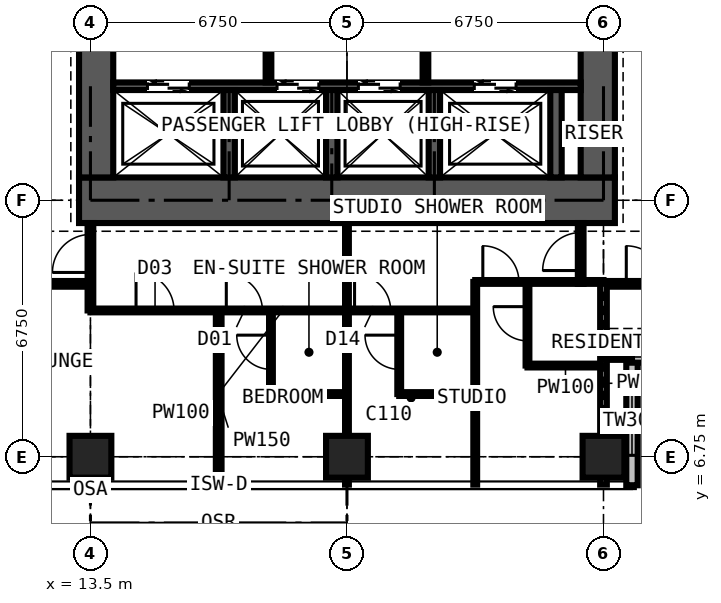
"""IFC4 building model, lengths in metres.
Left out: names, types, materials, properties, quantities, classifications, styles, units other than length and angle.
Written with IfcOpenShell. Run it as: python <this file> out.ifc"""

import sys

from ifc_helpers import new_model, si_unit, direction, frame, frame_2d, origin, origin_2d, place, context, subcontext, project, spatial, rectangle, extrude, element, fill, save


model = new_model("IFC4")
c1 = context("Model", 3, precision=1e-05, world=origin(), true_north=direction((0.0, 1.0)))
c2 = subcontext(c1, "Body", "Model", "MODEL_VIEW")
j1 = project(units=[si_unit("LENGTHUNIT", "METRE"), si_unit("PLANEANGLEUNIT", "RADIAN")], contexts=[c1])
p1 = place(None, origin())
s1 = spatial("IfcSite", under=j1, at=p1, CompositionType="ELEMENT")
p2 = place(p1, origin())
s2 = spatial("IfcBuilding", under=s1, at=p2, CompositionType="ELEMENT")
p3 = place(p2, frame((0.0, 0.0, 215.1)))
s3 = spatial("IfcBuildingStorey", under=s2, at=p3, CompositionType="ELEMENT", Elevation=215.1)
for number, where, z_axis, x_axis in (
    (1, (13.5, 6.75, 0.0), (0.0, 0.0, 1.0), (1.0, 0.0, 0.0)),
    (2, (20.25, 6.75, 0.0), (0.0, 0.0, 1.0), (1.0, 0.0, 0.0)),
    (3, (27.0, 6.75, 0.0), (0.0, 0.0, 1.0), (1.0, 0.0, 0.0)),
):
    element("IfcColumn", number, at=place(p3, frame(where, z_axis=z_axis, x_axis=x_axis)), inside=s3, PredefinedType="COLUMN", context=c2, shape_type="SweptSolid", body=[
        extrude(rectangle(XDim=1.1, YDim=1.1, at=origin_2d()), origin(), (0.0, 0.0, 1.0), 3.6),
    ])
p4 = place(p3, frame((13.2, 13.5, 0.0), z_axis=(0.0, 0.0, 1.0), x_axis=(1.0, 0.0, 0.0)))
e4 = element("IfcWall", 4, at=p4, inside=s3, PredefinedType="SHEAR", context=c2, shape_type="SweptSolid", body=[
    extrude(rectangle(XDim=14.1, YDim=1.2, at=frame_2d((7.05, 0.0))), origin(), (0.0, 0.0, 1.0), 3.6),
])
p5 = place(p3, frame((26.85, 14.1, 0.0), z_axis=(0.0, 0.0, 1.0), x_axis=(0.0, 1.0, 0.0)))
e5 = element("IfcWall", 5, at=p5, inside=s3, PredefinedType="SHEAR", context=c2, shape_type="SweptSolid", body=[
    extrude(rectangle(XDim=12.3, YDim=0.9, at=frame_2d((6.15, 0.0))), origin(), (0.0, 0.0, 1.0), 3.6),
])
p6 = place(p5, frame((3.65, 0.0, 0.0)))
e6 = element("IfcOpeningElement", 6, at=p6, cuts=e5, PredefinedType="OPENING", context=c2, shape_type="SweptSolid", body=[
    extrude(rectangle(XDim=1.2, YDim=2.2, at=frame_2d((0.6, 1.1))), frame((0.0, 0.46, 0.0), z_axis=(0.0, -1.0, 0.0), x_axis=(1.0, 0.0, 0.0)), (0.0, 0.0, 1.0), 0.92),
])
p7 = place(p3, frame((13.65, 26.4, 0.0), z_axis=(0.0, 0.0, 1.0), x_axis=(0.0, -1.0, 0.0)))
e7 = element("IfcWall", 7, at=p7, inside=s3, PredefinedType="SHEAR", context=c2, shape_type="SweptSolid", body=[
    extrude(rectangle(XDim=12.3, YDim=0.9, at=frame_2d((6.15, 0.0))), origin(), (0.0, 0.0, 1.0), 3.6),
])
p8 = place(p7, frame((7.45, 0.0, 0.0)))
e8 = element("IfcOpeningElement", 8, at=p8, cuts=e7, PredefinedType="OPENING", context=c2, shape_type="SweptSolid", body=[
    extrude(rectangle(XDim=1.2, YDim=2.2, at=frame_2d((0.6, 1.1))), frame((0.0, 0.46, 0.0), z_axis=(0.0, -1.0, 0.0), x_axis=(1.0, 0.0, 0.0)), (0.0, 0.0, 1.0), 0.92),
])
p9 = place(p3, frame((27.75, 6.0, 0.0), z_axis=(0.0, 0.0, 1.0), x_axis=(0.0, 1.0, 0.0)))
e9 = element("IfcWall", 9, at=p9, inside=s3, PredefinedType="SOLIDWALL", context=c2, shape_type="SweptSolid", body=[
    extrude(rectangle(XDim=3.375, YDim=0.3, at=frame_2d((1.688, 0.0))), origin(), (0.0, 0.0, 1.0), 3.375),
])
p10 = place(p9, frame((0.788, 0.0, 0.6)))
e10 = element("IfcOpeningElement", 10, at=p10, cuts=e9, PredefinedType="OPENING", context=c2, shape_type="SweptSolid", body=[
    extrude(rectangle(XDim=1.8, YDim=2.1, at=frame_2d((0.9, 1.05))), frame((0.0, 0.16, 0.0), z_axis=(0.0, -1.0, 0.0), x_axis=(1.0, 0.0, 0.0)), (0.0, 0.0, 1.0), 0.32),
])
p11 = place(p3, frame((27.75, 9.375, 0.0), z_axis=(0.0, 0.0, 1.0), x_axis=(1.0, 0.0, 0.0)))
e11 = element("IfcWall", 11, at=p11, inside=s3, PredefinedType="SOLIDWALL", context=c2, shape_type="SweptSolid", body=[
    extrude(rectangle(XDim=3.375, YDim=0.3, at=frame_2d((1.688, 0.0))), origin(), (0.0, 0.0, 1.0), 3.375),
])
p12 = place(p11, frame((0.788, 0.0, 0.6)))
e12 = element("IfcOpeningElement", 12, at=p12, cuts=e11, PredefinedType="OPENING", context=c2, shape_type="SweptSolid", body=[
    extrude(rectangle(XDim=1.8, YDim=2.1, at=frame_2d((0.9, 1.05))), frame((0.0, 0.16, 0.0), z_axis=(0.0, -1.0, 0.0), x_axis=(1.0, 0.0, 0.0)), (0.0, 0.0, 1.0), 0.32),
])
p13 = place(p3, frame((14.1, 16.5, 0.0), z_axis=(0.0, 0.0, 1.0), x_axis=(1.0, 0.0, 0.0)))
e13 = element("IfcWall", 13, at=p13, inside=s3, PredefinedType="SHEAR", context=c2, shape_type="SweptSolid", body=[
    extrude(rectangle(XDim=12.3, YDim=0.2, at=frame_2d((6.15, 0.0))), origin(), (0.0, 0.0, 1.0), 3.6),
])
p14 = place(p13, frame((0.9, 0.0, 0.0)))
e14 = element("IfcOpeningElement", 14, at=p14, cuts=e13, PredefinedType="OPENING", context=c2, shape_type="SweptSolid", body=[
    extrude(rectangle(XDim=1.1, YDim=2.2, at=frame_2d((0.55, 1.1))), frame((0.0, 0.11, 0.0), z_axis=(0.0, -1.0, 0.0), x_axis=(1.0, 0.0, 0.0)), (0.0, 0.0, 1.0), 0.22),
])
p15 = place(p13, frame((4.31, 0.0, 0.0)))
e15 = element("IfcOpeningElement", 15, at=p15, cuts=e13, PredefinedType="OPENING", context=c2, shape_type="SweptSolid", body=[
    extrude(rectangle(XDim=1.1, YDim=2.2, at=frame_2d((0.55, 1.1))), frame((0.0, 0.11, 0.0), z_axis=(0.0, -1.0, 0.0), x_axis=(1.0, 0.0, 0.0)), (0.0, 0.0, 1.0), 0.22),
])
p16 = place(p13, frame((6.45, 0.0, 0.0)))
e16 = element("IfcOpeningElement", 16, at=p16, cuts=e13, PredefinedType="OPENING", context=c2, shape_type="SweptSolid", body=[
    extrude(rectangle(XDim=1.1, YDim=2.2, at=frame_2d((0.55, 1.1))), frame((0.0, 0.11, 0.0), z_axis=(0.0, -1.0, 0.0), x_axis=(1.0, 0.0, 0.0)), (0.0, 0.0, 1.0), 0.22),
])
p17 = place(p13, frame((9.5, 0.0, 0.0)))
e17 = element("IfcOpeningElement", 17, at=p17, cuts=e13, PredefinedType="OPENING", context=c2, shape_type="SweptSolid", body=[
    extrude(rectangle(XDim=1.1, YDim=2.2, at=frame_2d((0.55, 1.1))), frame((0.0, 0.11, 0.0), z_axis=(0.0, -1.0, 0.0), x_axis=(1.0, 0.0, 0.0)), (0.0, 0.0, 1.0), 0.22),
])
for number, where, z_axis, x_axis in (
    (18, (17.15, 14.1, 0.0), (0.0, 0.0, 1.0), (0.0, 1.0, 0.0)),
    (19, (19.85, 14.1, 0.0), (0.0, 0.0, 1.0), (0.0, 1.0, 0.0)),
    (20, (22.55, 14.1, 0.0), (0.0, 0.0, 1.0), (0.0, 1.0, 0.0)),
    (21, (25.75, 14.1, 0.0), (0.0, 0.0, 1.0), (0.0, 1.0, 0.0)),
):
    element("IfcWall", number, at=place(p3, frame(where, z_axis=z_axis, x_axis=x_axis)), inside=s3, PredefinedType="SHEAR", context=c2, shape_type="SweptSolid", body=[
        extrude(rectangle(XDim=2.3, YDim=0.3, at=frame_2d((1.15, 0.0))), origin(), (0.0, 0.0, 1.0), 3.6),
    ])
p18 = place(p3, frame((18.185, 16.6, 0.0), z_axis=(0.0, 0.0, 1.0), x_axis=(0.0, 1.0, 0.0)))
e22 = element("IfcWall", 22, at=p18, inside=s3, PredefinedType="PARTITIONING", context=c2, shape_type="SweptSolid", body=[
    extrude(rectangle(XDim=3.5, YDim=0.15, at=frame_2d((1.75, 0.0))), origin(), (0.0, 0.0, 1.0), 3.375),
])
p19 = place(p18, frame((1.15, 0.0, 0.0)))
e23 = element("IfcOpeningElement", 23, at=p19, cuts=e22, PredefinedType="OPENING", context=c2, shape_type="SweptSolid", body=[
    extrude(rectangle(XDim=1.2, YDim=2.2, at=frame_2d((0.6, 1.1))), frame((0.0, 0.085, 0.0), z_axis=(0.0, -1.0, 0.0), x_axis=(1.0, 0.0, 0.0)), (0.0, 0.0, 1.0), 0.17),
])
p20 = place(p3, frame((22.315, 16.6, 0.0), z_axis=(0.0, 0.0, 1.0), x_axis=(0.0, 1.0, 0.0)))
e24 = element("IfcWall", 24, at=p20, inside=s3, PredefinedType="PARTITIONING", context=c2, shape_type="SweptSolid", body=[
    extrude(rectangle(XDim=3.5, YDim=0.15, at=frame_2d((1.75, 0.0))), origin(), (0.0, 0.0, 1.0), 3.375),
])
p21 = place(p20, frame((1.15, 0.0, 0.0)))
e25 = element("IfcOpeningElement", 25, at=p21, cuts=e24, PredefinedType="OPENING", context=c2, shape_type="SweptSolid", body=[
    extrude(rectangle(XDim=1.2, YDim=2.2, at=frame_2d((0.6, 1.1))), frame((0.0, 0.085, 0.0), z_axis=(0.0, -1.0, 0.0), x_axis=(1.0, 0.0, 0.0)), (0.0, 0.0, 1.0), 0.17),
])
p22 = place(p3, frame((10.125, 11.3, 0.0), z_axis=(0.0, 0.0, 1.0), x_axis=(1.0, 0.0, 0.0)))
e26 = element("IfcWall", 26, at=p22, inside=s3, PredefinedType="PARTITIONING", context=c2, shape_type="SweptSolid", body=[
    extrude(rectangle(XDim=3.375, YDim=0.15, at=frame_2d((1.688, 0.0))), origin(), (0.0, 0.0, 1.0), 3.375),
])
p23 = place(p3, frame((13.5, 10.6, 0.0), z_axis=(0.0, 0.0, 1.0), x_axis=(0.0, 1.0, 0.0)))
e27 = element("IfcWall", 27, at=p23, inside=s3, PredefinedType="PARTITIONING", context=c2, shape_type="SweptSolid", body=[
    extrude(rectangle(XDim=2.3, YDim=0.15, at=frame_2d((1.15, 0.0))), origin(), (0.0, 0.0, 1.0), 2.877),
])
p24 = place(p23, frame((1.0, 0.0, 0.0)))
e28 = element("IfcOpeningElement", 28, at=p24, cuts=e27, PredefinedType="OPENING", context=c2, shape_type="SweptSolid", body=[
    extrude(rectangle(XDim=1.0, YDim=2.2, at=frame_2d((0.5, 1.1))), frame((0.0, 0.085, 0.0), z_axis=(0.0, -1.0, 0.0), x_axis=(1.0, 0.0, 0.0)), (0.0, 0.0, 1.0), 0.17),
])
p25 = place(p3, frame((13.5, 10.6, 0.0), z_axis=(0.0, 0.0, 1.0), x_axis=(1.0, 0.0, 0.0)))
e29 = element("IfcWall", 29, at=p25, inside=s3, PredefinedType="PARTITIONING", context=c2, shape_type="SweptSolid", body=[
    extrude(rectangle(XDim=10.125, YDim=0.1, at=frame_2d((5.062, 0.0))), origin(), (0.0, 0.0, 1.0), 3.375),
])
p26 = place(p25, frame((1.2, 0.0, 0.0)))
e30 = element("IfcOpeningElement", 30, at=p26, cuts=e29, PredefinedType="OPENING", context=c2, shape_type="SweptSolid", body=[
    extrude(rectangle(XDim=1.0, YDim=2.2, at=frame_2d((0.5, 1.1))), frame((0.0, 0.06, 0.0), z_axis=(0.0, -1.0, 0.0), x_axis=(1.0, 0.0, 0.0)), (0.0, 0.0, 1.0), 0.12),
])
p27 = place(p25, frame((3.575, 0.0, 0.0)))
e31 = element("IfcOpeningElement", 31, at=p27, cuts=e29, PredefinedType="OPENING", context=c2, shape_type="SweptSolid", body=[
    extrude(rectangle(XDim=0.95, YDim=2.2, at=frame_2d((0.475, 1.1))), frame((0.0, 0.06, 0.0), z_axis=(0.0, -1.0, 0.0), x_axis=(1.0, 0.0, 0.0)), (0.0, 0.0, 1.0), 0.12),
])
p28 = place(p25, frame((6.95, 0.0, 0.0)))
e32 = element("IfcOpeningElement", 32, at=p28, cuts=e29, PredefinedType="OPENING", context=c2, shape_type="SweptSolid", body=[
    extrude(rectangle(XDim=0.95, YDim=2.2, at=frame_2d((0.475, 1.1))), frame((0.0, 0.06, 0.0), z_axis=(0.0, -1.0, 0.0), x_axis=(1.0, 0.0, 0.0)), (0.0, 0.0, 1.0), 0.12),
])
p29 = place(p3, frame((16.875, 6.016, 0.0), z_axis=(0.0, 0.0, 1.0), x_axis=(0.0, 1.0, 0.0)))
e33 = element("IfcWall", 33, at=p29, inside=s3, PredefinedType="PARTITIONING", context=c2, shape_type="SweptSolid", body=[
    extrude(rectangle(XDim=4.584, YDim=0.15, at=frame_2d((2.292, 0.0))), origin(), (0.0, 0.0, 1.0), 3.375),
])
p30 = place(p3, frame((18.25, 8.4, 0.0), z_axis=(0.0, 0.0, 1.0), x_axis=(0.0, 1.0, 0.0)))
e34 = element("IfcWall", 34, at=p30, inside=s3, PredefinedType="PARTITIONING", context=c2, shape_type="SweptSolid", body=[
    extrude(rectangle(XDim=2.2, YDim=0.1, at=frame_2d((1.1, 0.0))), origin(), (0.0, 0.0, 1.0), 3.375),
])
p31 = place(p30, frame((0.65, 0.0, 0.0)))
e35 = element("IfcOpeningElement", 35, at=p31, cuts=e34, PredefinedType="OPENING", context=c2, shape_type="SweptSolid", body=[
    extrude(rectangle(XDim=0.9, YDim=2.2, at=frame_2d((0.45, 1.1))), frame((0.0, 0.06, 0.0), z_axis=(0.0, -1.0, 0.0), x_axis=(1.0, 0.0, 0.0)), (0.0, 0.0, 1.0), 0.12),
])
p32 = place(p3, frame((18.25, 8.4, 0.0), z_axis=(0.0, 0.0, 1.0), x_axis=(1.0, 0.0, 0.0)))
e36 = element("IfcWall", 36, at=p32, inside=s3, PredefinedType="PARTITIONING", context=c2, shape_type="SweptSolid", body=[
    extrude(rectangle(XDim=2.0, YDim=0.1, at=frame_2d((1.0, 0.0))), origin(), (0.0, 0.0, 1.0), 3.375),
])
p33 = place(p3, frame((20.25, 6.016, 0.0), z_axis=(0.0, 0.0, 1.0), x_axis=(0.0, 1.0, 0.0)))
e37 = element("IfcWall", 37, at=p33, inside=s3, PredefinedType="PARTITIONING", context=c2, shape_type="SweptSolid", body=[
    extrude(rectangle(XDim=6.884, YDim=0.1, at=frame_2d((3.442, 0.0))), origin(), (0.0, 0.0, 1.0), 2.61),
])
p34 = place(p3, frame((21.625, 8.4, 0.0), z_axis=(0.0, 0.0, 1.0), x_axis=(0.0, 1.0, 0.0)))
e38 = element("IfcWall", 38, at=p34, inside=s3, PredefinedType="PARTITIONING", context=c2, shape_type="SweptSolid", body=[
    extrude(rectangle(XDim=2.2, YDim=0.1, at=frame_2d((1.1, 0.0))), origin(), (0.0, 0.0, 1.0), 3.375),
])
p35 = place(p34, frame((0.65, 0.0, 0.0)))
e39 = element("IfcOpeningElement", 39, at=p35, cuts=e38, PredefinedType="OPENING", context=c2, shape_type="SweptSolid", body=[
    extrude(rectangle(XDim=0.9, YDim=2.2, at=frame_2d((0.45, 1.1))), frame((0.0, 0.06, 0.0), z_axis=(0.0, -1.0, 0.0), x_axis=(1.0, 0.0, 0.0)), (0.0, 0.0, 1.0), 0.12),
])
p36 = place(p3, frame((21.625, 8.4, 0.0), z_axis=(0.0, 0.0, 1.0), x_axis=(1.0, 0.0, 0.0)))
e40 = element("IfcWall", 40, at=p36, inside=s3, PredefinedType="PARTITIONING", context=c2, shape_type="SweptSolid", body=[
    extrude(rectangle(XDim=2.0, YDim=0.1, at=frame_2d((1.0, 0.0))), origin(), (0.0, 0.0, 1.0), 3.375),
])
p37 = place(p3, frame((23.625, 6.016, 0.0), z_axis=(0.0, 0.0, 1.0), x_axis=(0.0, 1.0, 0.0)))
e41 = element("IfcWall", 41, at=p37, inside=s3, PredefinedType="PARTITIONING", context=c2, shape_type="SweptSolid", body=[
    extrude(rectangle(XDim=5.334, YDim=0.1, at=frame_2d((2.667, 0.0))), origin(), (0.0, 0.0, 1.0), 3.375),
])
p38 = place(p3, frame((23.625, 11.35, 0.0), z_axis=(0.0, 0.0, 1.0), x_axis=(1.0, 0.0, 0.0)))
e42 = element("IfcWall", 42, at=p38, inside=s3, PredefinedType="PARTITIONING", context=c2, shape_type="SweptSolid", body=[
    extrude(rectangle(XDim=3.375, YDim=0.1, at=frame_2d((1.688, 0.0))), origin(), (0.0, 0.0, 1.0), 3.375),
])
p39 = place(p38, frame((0.2, 0.0, 0.0)))
e43 = element("IfcOpeningElement", 43, at=p39, cuts=e42, PredefinedType="OPENING", context=c2, shape_type="SweptSolid", body=[
    extrude(rectangle(XDim=0.95, YDim=2.2, at=frame_2d((0.475, 1.1))), frame((0.0, 0.06, 0.0), z_axis=(0.0, -1.0, 0.0), x_axis=(1.0, 0.0, 0.0)), (0.0, 0.0, 1.0), 0.12),
])
p40 = place(p3, frame((25.0, 9.15, 0.0), z_axis=(0.0, 0.0, 1.0), x_axis=(0.0, 1.0, 0.0)))
e44 = element("IfcWall", 44, at=p40, inside=s3, PredefinedType="PARTITIONING", context=c2, shape_type="SweptSolid", body=[
    extrude(rectangle(XDim=2.2, YDim=0.1, at=frame_2d((1.1, 0.0))), origin(), (0.0, 0.0, 1.0), 3.375),
])
p41 = place(p40, frame((0.65, 0.0, 0.0)))
e45 = element("IfcOpeningElement", 45, at=p41, cuts=e44, PredefinedType="OPENING", context=c2, shape_type="SweptSolid", body=[
    extrude(rectangle(XDim=0.9, YDim=2.2, at=frame_2d((0.45, 1.1))), frame((0.0, 0.06, 0.0), z_axis=(0.0, -1.0, 0.0), x_axis=(1.0, 0.0, 0.0)), (0.0, 0.0, 1.0), 0.12),
])
p42 = place(p3, frame((25.0, 9.15, 0.0), z_axis=(0.0, 0.0, 1.0), x_axis=(1.0, 0.0, 0.0)))
e46 = element("IfcWall", 46, at=p42, inside=s3, PredefinedType="PARTITIONING", context=c2, shape_type="SweptSolid", body=[
    extrude(rectangle(XDim=2.0, YDim=0.1, at=frame_2d((1.0, 0.0))), origin(), (0.0, 0.0, 1.0), 3.375),
])
p43 = place(p3, frame((26.4, 11.3, 0.0), z_axis=(0.0, 0.0, 1.0), x_axis=(0.0, 1.0, 0.0)))
e47 = element("IfcWall", 47, at=p43, inside=s3, PredefinedType="PARTITIONING", context=c2, shape_type="SweptSolid", body=[
    extrude(rectangle(XDim=1.6, YDim=0.15, at=frame_2d((0.8, 0.0))), origin(), (0.0, 0.0, 1.0), 3.375),
])
p44 = place(p43, frame((0.35, 0.0, 0.0)))
e48 = element("IfcOpeningElement", 48, at=p44, cuts=e47, PredefinedType="OPENING", context=c2, shape_type="SweptSolid", body=[
    extrude(rectangle(XDim=1.0, YDim=2.2, at=frame_2d((0.5, 1.1))), frame((0.0, 0.085, 0.0), z_axis=(0.0, -1.0, 0.0), x_axis=(1.0, 0.0, 0.0)), (0.0, 0.0, 1.0), 0.17),
])
p45 = place(p3, frame((27.0, 11.3, 0.0), z_axis=(0.0, 0.0, 1.0), x_axis=(1.0, 0.0, 0.0)))
e49 = element("IfcWall", 49, at=p45, inside=s3, PredefinedType="PARTITIONING", context=c2, shape_type="SweptSolid", body=[
    extrude(rectangle(XDim=3.375, YDim=0.15, at=frame_2d((1.688, 0.0))), origin(), (0.0, 0.0, 1.0), 3.375),
])
p46 = place(p45, frame((0.6, 0.0, 0.0)))
e50 = element("IfcOpeningElement", 50, at=p46, cuts=e49, PredefinedType="OPENING", context=c2, shape_type="SweptSolid", body=[
    extrude(rectangle(XDim=1.0, YDim=2.2, at=frame_2d((0.5, 1.1))), frame((0.0, 0.085, 0.0), z_axis=(0.0, -1.0, 0.0), x_axis=(1.0, 0.0, 0.0)), (0.0, 0.0, 1.0), 0.17),
])
p47 = place(p3, frame((27.0, 6.016, 0.0), z_axis=(0.0, 0.0, 1.0), x_axis=(0.0, 1.0, 0.0)))
e51 = element("IfcWall", 51, at=p47, inside=s3, PredefinedType="PARTITIONING", context=c2, shape_type="SweptSolid", body=[
    extrude(rectangle(XDim=5.334, YDim=0.175, at=frame_2d((2.667, 0.0))), origin(), (0.0, 0.0, 1.0), 2.877),
])
p48 = place(p3, frame((27.0, 9.375, 0.0), z_axis=(0.0, 0.0, 1.0), x_axis=(1.0, 0.0, 0.0)))
e52 = element("IfcWall", 52, at=p48, inside=s3, PredefinedType="PARTITIONING", context=c2, shape_type="SweptSolid", body=[
    extrude(rectangle(XDim=0.734, YDim=0.15, at=frame_2d((0.367, 0.0))), origin(), (0.0, 0.0, 1.0), 3.375),
])
p49 = place(p10, origin())
e53 = element("IfcWindow", 53, at=p49, inside=s3, PartitioningType="SINGLE_PANEL", PredefinedType="WINDOW", context=c2, shape_type="SweptSolid", body=[
    extrude(rectangle(XDim=1.8, YDim=2.1, at=frame_2d((0.9, 1.05))), frame((0.0, 0.03, 0.0), z_axis=(0.0, -1.0, 0.0), x_axis=(1.0, 0.0, 0.0)), (0.0, 0.0, 1.0), 0.06),
])
fill(e10, e53)
p50 = place(p14, origin())
e54 = element("IfcDoor", 54, at=p50, inside=s3, OperationType="DOUBLE_DOOR_SLIDING", PredefinedType="DOOR", context=c2, shape_type="SweptSolid", body=[
    extrude(rectangle(XDim=1.1, YDim=2.2, at=frame_2d((0.55, 1.1))), frame((0.0, 0.025, 0.0), z_axis=(0.0, -1.0, 0.0), x_axis=(1.0, 0.0, 0.0)), (0.0, 0.0, 1.0), 0.05),
])
fill(e14, e54)
p51 = place(p15, origin())
e55 = element("IfcDoor", 55, at=p51, inside=s3, OperationType="DOUBLE_DOOR_SLIDING", PredefinedType="DOOR", context=c2, shape_type="SweptSolid", body=[
    extrude(rectangle(XDim=1.1, YDim=2.2, at=frame_2d((0.55, 1.1))), frame((0.0, 0.025, 0.0), z_axis=(0.0, -1.0, 0.0), x_axis=(1.0, 0.0, 0.0)), (0.0, 0.0, 1.0), 0.05),
])
fill(e15, e55)
p52 = place(p16, origin())
e56 = element("IfcDoor", 56, at=p52, inside=s3, OperationType="DOUBLE_DOOR_SLIDING", PredefinedType="DOOR", context=c2, shape_type="SweptSolid", body=[
    extrude(rectangle(XDim=1.1, YDim=2.2, at=frame_2d((0.55, 1.1))), frame((0.0, 0.025, 0.0), z_axis=(0.0, -1.0, 0.0), x_axis=(1.0, 0.0, 0.0)), (0.0, 0.0, 1.0), 0.05),
])
fill(e16, e56)
p53 = place(p17, origin())
e57 = element("IfcDoor", 57, at=p53, inside=s3, OperationType="DOUBLE_DOOR_SLIDING", PredefinedType="DOOR", context=c2, shape_type="SweptSolid", body=[
    extrude(rectangle(XDim=1.1, YDim=2.2, at=frame_2d((0.55, 1.1))), frame((0.0, 0.025, 0.0), z_axis=(0.0, -1.0, 0.0), x_axis=(1.0, 0.0, 0.0)), (0.0, 0.0, 1.0), 0.05),
])
fill(e17, e57)
p54 = place(p26, origin())
e58 = element("IfcDoor", 58, at=p54, inside=s3, OperationType="SINGLE_SWING_LEFT", PredefinedType="DOOR", context=c2, shape_type="SweptSolid", body=[
    extrude(rectangle(XDim=1.0, YDim=2.2, at=frame_2d((0.5, 1.1))), frame((0.0, 0.025, 0.0), z_axis=(0.0, -1.0, 0.0), x_axis=(1.0, 0.0, 0.0)), (0.0, 0.0, 1.0), 0.05),
])
fill(e30, e58)
p55 = place(p27, origin())
e59 = element("IfcDoor", 59, at=p55, inside=s3, OperationType="SINGLE_SWING_LEFT", PredefinedType="DOOR", context=c2, shape_type="SweptSolid", body=[
    extrude(rectangle(XDim=0.95, YDim=2.2, at=frame_2d((0.475, 1.1))), frame((0.0, 0.025, 0.0), z_axis=(0.0, -1.0, 0.0), x_axis=(1.0, 0.0, 0.0)), (0.0, 0.0, 1.0), 0.05),
])
fill(e31, e59)
p56 = place(p31, origin())
e60 = element("IfcDoor", 60, at=p56, inside=s3, OperationType="SINGLE_SWING_RIGHT", PredefinedType="DOOR", context=c2, shape_type="SweptSolid", body=[
    extrude(rectangle(XDim=0.9, YDim=2.2, at=frame_2d((0.45, 1.1))), frame((0.0, 0.025, 0.0), z_axis=(0.0, -1.0, 0.0), x_axis=(1.0, 0.0, 0.0)), (0.0, 0.0, 1.0), 0.05),
])
fill(e35, e60)
p57 = place(p24, origin())
e61 = element("IfcDoor", 61, at=p57, inside=s3, OperationType="SINGLE_SWING_LEFT", PredefinedType="DOOR", context=c2, shape_type="SweptSolid", body=[
    extrude(rectangle(XDim=1.0, YDim=2.2, at=frame_2d((0.5, 1.1))), frame((0.0, 0.025, 0.0), z_axis=(0.0, -1.0, 0.0), x_axis=(1.0, 0.0, 0.0)), (0.0, 0.0, 1.0), 0.05),
])
fill(e28, e61)
p58 = place(p28, origin())
e62 = element("IfcDoor", 62, at=p58, inside=s3, OperationType="SINGLE_SWING_LEFT", PredefinedType="DOOR", context=c2, shape_type="SweptSolid", body=[
    extrude(rectangle(XDim=0.95, YDim=2.2, at=frame_2d((0.475, 1.1))), frame((0.0, 0.025, 0.0), z_axis=(0.0, -1.0, 0.0), x_axis=(1.0, 0.0, 0.0)), (0.0, 0.0, 1.0), 0.05),
])
fill(e32, e62)
p59 = place(p35, origin())
e63 = element("IfcDoor", 63, at=p59, inside=s3, OperationType="SINGLE_SWING_RIGHT", PredefinedType="DOOR", context=c2, shape_type="SweptSolid", body=[
    extrude(rectangle(XDim=0.9, YDim=2.2, at=frame_2d((0.45, 1.1))), frame((0.0, 0.025, 0.0), z_axis=(0.0, -1.0, 0.0), x_axis=(1.0, 0.0, 0.0)), (0.0, 0.0, 1.0), 0.05),
])
fill(e39, e63)
p60 = place(p39, origin())
e64 = element("IfcDoor", 64, at=p60, inside=s3, OperationType="SINGLE_SWING_LEFT", PredefinedType="DOOR", context=c2, shape_type="SweptSolid", body=[
    extrude(rectangle(XDim=0.95, YDim=2.2, at=frame_2d((0.475, 1.1))), frame((0.0, 0.025, 0.0), z_axis=(0.0, -1.0, 0.0), x_axis=(1.0, 0.0, 0.0)), (0.0, 0.0, 1.0), 0.05),
])
fill(e43, e64)
p61 = place(p41, origin())
e65 = element("IfcDoor", 65, at=p61, inside=s3, OperationType="SINGLE_SWING_RIGHT", PredefinedType="DOOR", context=c2, shape_type="SweptSolid", body=[
    extrude(rectangle(XDim=0.9, YDim=2.2, at=frame_2d((0.45, 1.1))), frame((0.0, 0.025, 0.0), z_axis=(0.0, -1.0, 0.0), x_axis=(1.0, 0.0, 0.0)), (0.0, 0.0, 1.0), 0.05),
])
fill(e45, e65)
p62 = place(p46, origin())
e66 = element("IfcDoor", 66, at=p62, inside=s3, OperationType="SINGLE_SWING_LEFT", PredefinedType="DOOR", context=c2, shape_type="SweptSolid", body=[
    extrude(rectangle(XDim=1.0, YDim=2.2, at=frame_2d((0.5, 1.1))), frame((0.0, 0.025, 0.0), z_axis=(0.0, -1.0, 0.0), x_axis=(1.0, 0.0, 0.0)), (0.0, 0.0, 1.0), 0.05),
])
fill(e50, e66)
p63 = place(p44, origin())
e67 = element("IfcDoor", 67, at=p63, inside=s3, OperationType="SINGLE_SWING_LEFT", PredefinedType="DOOR", context=c2, shape_type="SweptSolid", body=[
    extrude(rectangle(XDim=1.0, YDim=2.2, at=frame_2d((0.5, 1.1))), frame((0.0, 0.025, 0.0), z_axis=(0.0, -1.0, 0.0), x_axis=(1.0, 0.0, 0.0)), (0.0, 0.0, 1.0), 0.05),
])
fill(e48, e67)
save(model, sys.argv[1])
